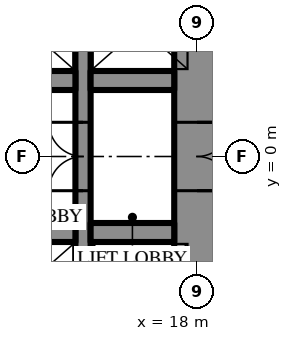
"""IFC4 building model, lengths in metres.
Left out: names, types, materials, properties, quantities, classifications, styles, units other than length and angle.
Written with IfcOpenShell. Run it as: python <this file> out.ifc"""

import sys

from ifc_helpers import new_model, si_unit, direction, frame, frame_2d, origin, place, context, subcontext, project, spatial, rectangle, extrude, element, fill, save


model = new_model("IFC4")
c1 = context("Model", 3, precision=1e-05, world=origin(), true_north=direction((0.0, 1.0)))
c2 = subcontext(c1, "Body", "Model", "MODEL_VIEW")
j1 = project(units=[si_unit("LENGTHUNIT", "METRE"), si_unit("PLANEANGLEUNIT", "RADIAN")], contexts=[c1])
p1 = place(None, origin())
s1 = spatial("IfcSite", under=j1, at=p1, CompositionType="ELEMENT")
p2 = place(p1, origin())
s2 = spatial("IfcBuilding", under=s1, at=p2, CompositionType="ELEMENT")
p3 = place(p2, frame((0.0, 0.0, 40.3)))
s3 = spatial("IfcBuildingStorey", under=s2, at=p3, CompositionType="ELEMENT", Elevation=40.3)
p4 = place(p3, frame((18.0, -10.7, 0.0), z_axis=(0.0, 0.0, 1.0), x_axis=(0.0, 1.0, 0.0)))
e1 = element("IfcWall", 1, at=p4, inside=s3, PredefinedType="SHEAR", context=c2, shape_type="SweptSolid", body=[
    extrude(rectangle(XDim=21.4, YDim=1.2, at=frame_2d((10.7, 0.0))), origin(), (0.0, 0.0, 1.0), 4.2),
])
p5 = place(p4, frame((9.8, 0.0, 0.0)))
e2 = element("IfcOpeningElement", 2, at=p5, cuts=e1, PredefinedType="OPENING", context=c2, shape_type="SweptSolid", body=[
    extrude(rectangle(XDim=1.8, YDim=2.4, at=frame_2d((0.9, 1.2))), frame((0.0, 0.61, 0.0), z_axis=(0.0, -1.0, 0.0), x_axis=(1.0, 0.0, 0.0)), (0.0, 0.0, 1.0), 1.22),
])
p6 = place(p3, frame((15.0, -10.7, 0.0), z_axis=(0.0, 0.0, 1.0), x_axis=(0.0, 1.0, 0.0)))
e3 = element("IfcWall", 3, at=p6, inside=s3, PredefinedType="SHEAR", context=c2, shape_type="SweptSolid", body=[
    extrude(rectangle(XDim=21.4, YDim=0.4, at=frame_2d((10.7, 0.0))), origin(), (0.0, 0.0, 1.0), 4.2),
])
p7 = place(p6, frame((9.8, 0.0, 0.0)))
e4 = element("IfcOpeningElement", 4, at=p7, cuts=e3, PredefinedType="OPENING", context=c2, shape_type="SweptSolid", body=[
    extrude(rectangle(XDim=1.8, YDim=2.4, at=frame_2d((0.9, 1.2))), frame((0.0, 0.21, 0.0), z_axis=(0.0, -1.0, 0.0), x_axis=(1.0, 0.0, 0.0)), (0.0, 0.0, 1.0), 0.42),
])
p8 = place(p3, frame((12.3, 2.0, 0.0), z_axis=(0.0, 0.0, 1.0), x_axis=(1.0, 0.0, 0.0)))
e5 = element("IfcWall", 5, at=p8, inside=s3, PredefinedType="SHEAR", context=c2, shape_type="SweptSolid", body=[
    extrude(rectangle(XDim=2.5, YDim=0.5, at=frame_2d((1.25, 0.0))), origin(), (0.0, 0.0, 1.0), 4.2),
])
for number, where, z_axis, x_axis in (
    (6, (15.2, 2.0, 0.0), (0.0, 0.0, 1.0), (1.0, 0.0, 0.0)),
    (7, (17.4, -2.0, 0.0), (0.0, 0.0, 1.0), (-1.0, 0.0, 0.0)),
):
    element("IfcWall", number, at=place(p3, frame(where, z_axis=z_axis, x_axis=x_axis)), inside=s3, PredefinedType="SHEAR", context=c2, shape_type="SweptSolid", body=[
        extrude(rectangle(XDim=2.2, YDim=0.5, at=frame_2d((1.1, 0.0))), origin(), (0.0, 0.0, 1.0), 4.2),
    ])
p9 = place(p3, frame((14.8, -2.0, 0.0), z_axis=(0.0, 0.0, 1.0), x_axis=(-1.0, 0.0, 0.0)))
e8 = element("IfcWall", 8, at=p9, inside=s3, PredefinedType="SHEAR", context=c2, shape_type="SweptSolid", body=[
    extrude(rectangle(XDim=2.5, YDim=0.5, at=frame_2d((1.25, 0.0))), origin(), (0.0, 0.0, 1.0), 4.2),
])
p10 = place(p5, frame((1.8, 0.0, 0.0), z_axis=(0.0, 0.0, 1.0), x_axis=(-1.0, 0.0, 0.0)))
e9 = element("IfcDoor", 9, at=p10, inside=s3, OperationType="DOUBLE_DOOR_SINGLE_SWING", PredefinedType="DOOR", context=c2, shape_type="SweptSolid", body=[
    extrude(rectangle(XDim=1.8, YDim=2.4, at=frame_2d((0.9, 1.2))), frame((0.0, 0.025, 0.0), z_axis=(0.0, -1.0, 0.0), x_axis=(1.0, 0.0, 0.0)), (0.0, 0.0, 1.0), 0.05),
])
fill(e2, e9)
p11 = place(p7, origin())
e10 = element("IfcDoor", 10, at=p11, inside=s3, OperationType="DOUBLE_DOOR_SINGLE_SWING", PredefinedType="DOOR", context=c2, shape_type="SweptSolid", body=[
    extrude(rectangle(XDim=1.8, YDim=2.4, at=frame_2d((0.9, 1.2))), frame((0.0, 0.025, 0.0), z_axis=(0.0, -1.0, 0.0), x_axis=(1.0, 0.0, 0.0)), (0.0, 0.0, 1.0), 0.05),
])
fill(e4, e10)
save(model, sys.argv[1])
